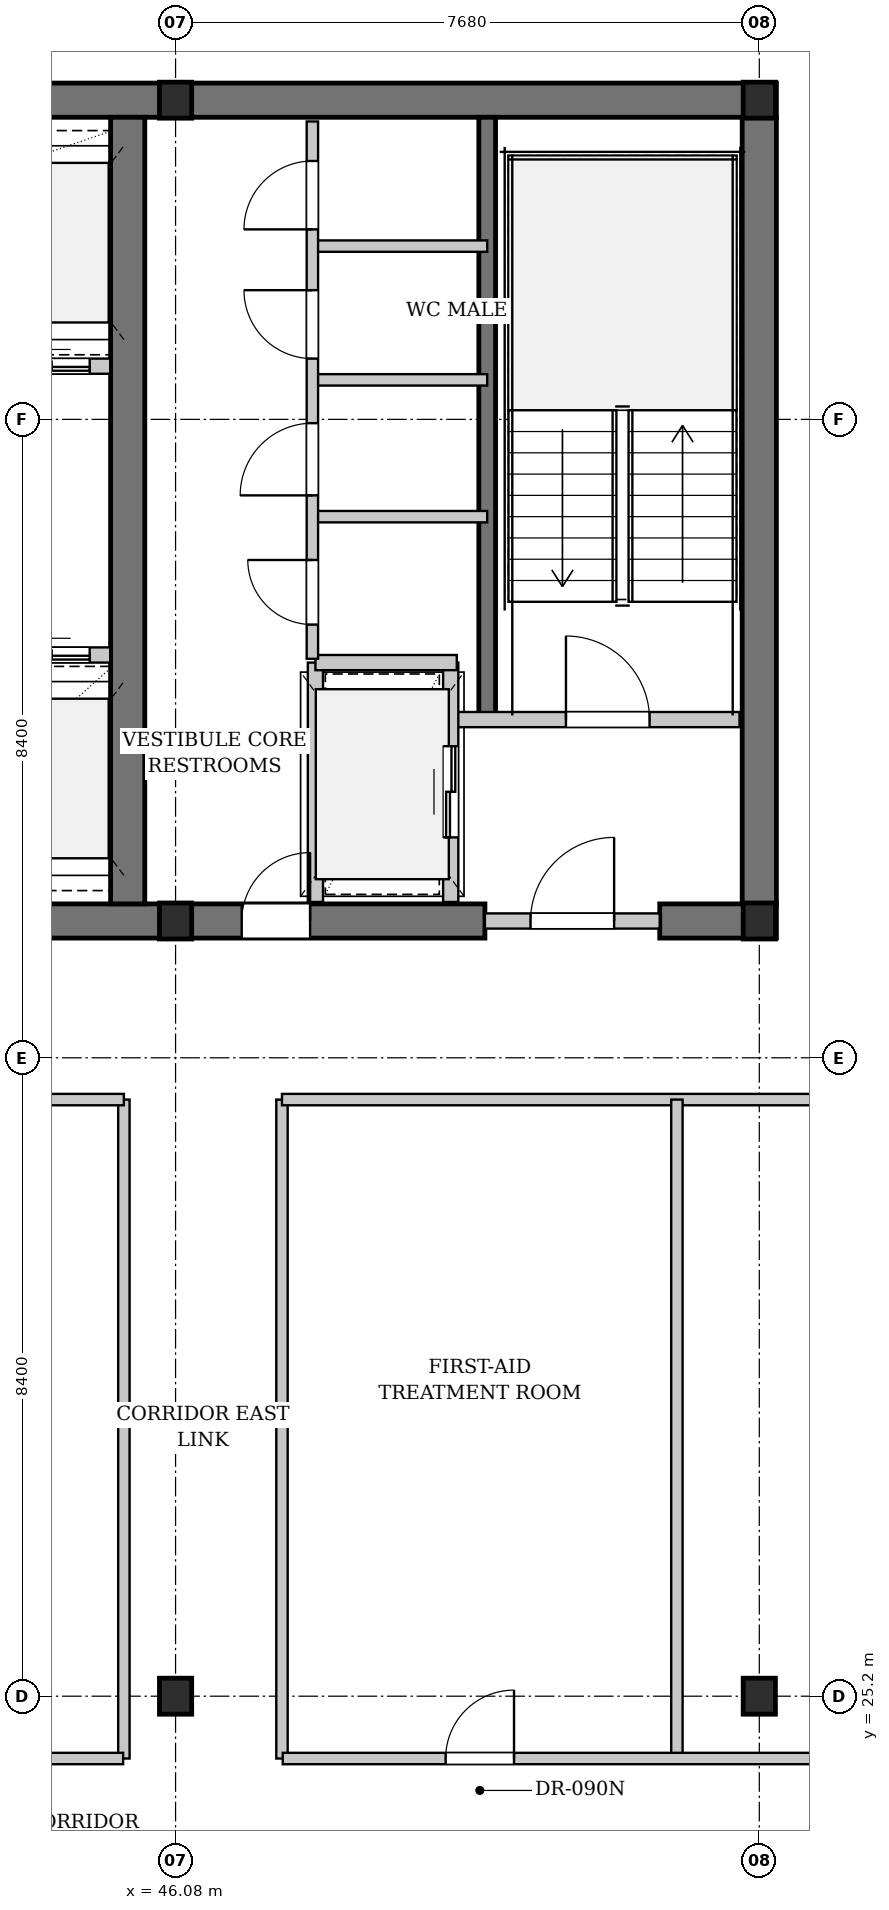
"""IFC4 building model, lengths in metres.
Left out: names, types, materials, properties, quantities, classifications, styles, units other than length and angle.
Written with IfcOpenShell. Run it as: python <this file> out.ifc"""

import sys

from ifc_helpers import new_model, si_unit, direction, frame, frame_2d, origin, origin_2d, place, context, subcontext, project, spatial, rectangle, i_section, extrude, element, fill, save


model = new_model("IFC4")
c1 = context("Model", 3, precision=1e-05, world=origin(), true_north=direction((0.0, 1.0)))
c2 = subcontext(c1, "Body", "Model", "MODEL_VIEW")
j1 = project(units=[si_unit("LENGTHUNIT", "METRE"), si_unit("PLANEANGLEUNIT", "RADIAN")], contexts=[c1])
p1 = place(None, origin())
s1 = spatial("IfcSite", under=j1, at=p1, CompositionType="ELEMENT")
p2 = place(p1, origin())
s2 = spatial("IfcBuilding", under=s1, at=p2, CompositionType="ELEMENT")
p3 = place(p2, frame((0.0, 0.0, 96.5)))
s3 = spatial("IfcBuildingStorey", under=s2, at=p3, CompositionType="ELEMENT", Elevation=96.5)
p4 = place(p3, frame((22.815, 46.2, 0.0), z_axis=(0.0, 0.0, 1.0), x_axis=(1.0, 0.0, 0.0)))
e1 = element("IfcWall", 1, at=p4, inside=s3, PredefinedType="SHEAR", context=c2, shape_type="SweptSolid", body=[
    extrude(rectangle(XDim=31.17, YDim=0.45, at=frame_2d((15.585, 0.0))), origin(), (0.0, 0.0, 1.0), 3.18),
])
p5 = place(p3, frame((42.1, 35.4, 0.0), z_axis=(0.0, 0.0, 1.0), x_axis=(1.0, 0.0, 0.0)))
e2 = element("IfcWall", 2, at=p5, inside=s3, PredefinedType="SHEAR", context=c2, shape_type="SweptSolid", body=[
    extrude(rectangle(XDim=8.05, YDim=0.45, at=frame_2d((4.025, 0.0))), origin(), (0.0, 0.0, 1.0), 3.18),
])
p6 = place(p5, frame((4.85, 0.0, 0.0)))
e3 = element("IfcOpeningElement", 3, at=p6, cuts=e2, PredefinedType="OPENING", context=c2, shape_type="SweptSolid", body=[
    extrude(rectangle(XDim=0.9, YDim=2.15, at=frame_2d((0.45, 1.075))), frame((0.0, 0.235, 0.0), z_axis=(0.0, -1.0, 0.0), x_axis=(1.0, 0.0, 0.0)), (0.0, 0.0, 1.0), 0.47),
])
p7 = place(p3, frame((52.45, 35.4, 0.0), z_axis=(0.0, 0.0, 1.0), x_axis=(1.0, 0.0, 0.0)))
e4 = element("IfcWall", 4, at=p7, inside=s3, PredefinedType="SHEAR", context=c2, shape_type="SweptSolid", body=[
    extrude(rectangle(XDim=1.535, YDim=0.45, at=frame_2d((0.768, 0.0))), origin(), (0.0, 0.0, 1.0), 3.18),
])
for number, where, z_axis, x_axis in (
    (5, (45.45, 35.625, 0.0), (0.0, 0.0, 1.0), (0.0, 1.0, 0.0)),
    (6, (53.76, 35.625, 0.0), (0.0, 0.0, 1.0), (0.0, 1.0, 0.0)),
):
    element("IfcWall", number, at=place(p3, frame(where, z_axis=z_axis, x_axis=x_axis)), inside=s3, PredefinedType="SHEAR", context=c2, shape_type="SweptSolid", body=[
        extrude(rectangle(XDim=10.35, YDim=0.45, at=frame_2d((5.175, 0.0))), origin(), (0.0, 0.0, 1.0), 3.18),
    ])
p8 = place(p3, frame((50.18, 38.05, 0.0), z_axis=(0.0, 0.0, 1.0), x_axis=(0.0, 1.0, 0.0)))
e7 = element("IfcWall", 7, at=p8, inside=s3, PredefinedType="SHEAR", context=c2, shape_type="SweptSolid", body=[
    extrude(rectangle(XDim=7.925, YDim=0.22, at=frame_2d((3.962, 0.0))), origin(), (0.0, 0.0, 1.0), 3.18),
])
for number, where, z_axis, x_axis in (
    (8, (46.08, 35.4, 0.0), (0.0, 0.0, 1.0), (1.0, 0.0, 0.0)),
    (9, (46.08, 46.2, 0.0), (0.0, 0.0, 1.0), (1.0, 0.0, 0.0)),
    (10, (46.08, 25.2, 0.0), (0.0, 0.0, 1.0), (1.0, 0.0, 0.0)),
    (11, (53.76, 35.4, 0.0), (0.0, 0.0, 1.0), (1.0, 0.0, 0.0)),
    (12, (53.76, 46.2, 0.0), (0.0, 0.0, 1.0), (1.0, 0.0, 0.0)),
    (13, (53.76, 25.2, 0.0), (0.0, 0.0, 1.0), (1.0, 0.0, 0.0)),
):
    element("IfcColumn", number, at=place(p3, frame(where, z_axis=z_axis, x_axis=x_axis)), inside=s3, PredefinedType="COLUMN", context=c2, shape_type="SweptSolid", body=[
        extrude(i_section(OverallWidth=0.424, OverallDepth=0.474, WebThickness=0.047, FlangeThickness=0.077, FilletRadius=0.015, at=origin_2d()), origin(), (0.0, 0.0, 1.0), 3.4),
    ])
p9 = place(p3, frame((41.85, 38.9, 0.0), z_axis=(0.0, 0.0, 1.0), x_axis=(1.0, 0.0, 0.0)))
e14 = element("IfcWall", 14, at=p9, inside=s3, PredefinedType="PARTITIONING", context=c2, shape_type="SweptSolid", body=[
    extrude(rectangle(XDim=3.37, YDim=0.2, at=frame_2d((1.685, 0.0))), origin(), (0.0, 0.0, 1.0), 3.18),
])
p10 = place(p9, frame((0.4, 0.0, 0.0)))
e15 = element("IfcOpeningElement", 15, at=p10, cuts=e14, PredefinedType="OPENING", context=c2, shape_type="SweptSolid", body=[
    extrude(rectangle(XDim=1.0, YDim=2.2, at=frame_2d((0.5, 1.1))), frame((0.0, 0.11, 0.0), z_axis=(0.0, -1.0, 0.0), x_axis=(1.0, 0.0, 0.0)), (0.0, 0.0, 1.0), 0.22),
])
p11 = place(p9, frame((2.1, 0.0, 0.0)))
e16 = element("IfcOpeningElement", 16, at=p11, cuts=e14, PredefinedType="OPENING", context=c2, shape_type="SweptSolid", body=[
    extrude(rectangle(XDim=1.0, YDim=2.2, at=frame_2d((0.5, 1.1))), frame((0.0, 0.11, 0.0), z_axis=(0.0, -1.0, 0.0), x_axis=(1.0, 0.0, 0.0)), (0.0, 0.0, 1.0), 0.22),
])
p12 = place(p3, frame((41.85, 42.7, 0.0), z_axis=(0.0, 0.0, 1.0), x_axis=(1.0, 0.0, 0.0)))
e17 = element("IfcWall", 17, at=p12, inside=s3, PredefinedType="PARTITIONING", context=c2, shape_type="SweptSolid", body=[
    extrude(rectangle(XDim=3.37, YDim=0.2, at=frame_2d((1.685, 0.0))), origin(), (0.0, 0.0, 1.0), 3.18),
])
p13 = place(p12, frame((0.4, 0.0, 0.0)))
e18 = element("IfcOpeningElement", 18, at=p13, cuts=e17, PredefinedType="OPENING", context=c2, shape_type="SweptSolid", body=[
    extrude(rectangle(XDim=1.0, YDim=2.2, at=frame_2d((0.5, 1.1))), frame((0.0, 0.11, 0.0), z_axis=(0.0, -1.0, 0.0), x_axis=(1.0, 0.0, 0.0)), (0.0, 0.0, 1.0), 0.22),
])
p14 = place(p12, frame((2.1, 0.0, 0.0)))
e19 = element("IfcOpeningElement", 19, at=p14, cuts=e17, PredefinedType="OPENING", context=c2, shape_type="SweptSolid", body=[
    extrude(rectangle(XDim=1.0, YDim=2.2, at=frame_2d((0.5, 1.1))), frame((0.0, 0.11, 0.0), z_axis=(0.0, -1.0, 0.0), x_axis=(1.0, 0.0, 0.0)), (0.0, 0.0, 1.0), 0.22),
])
p15 = place(p3, frame((49.78, 38.05, 0.0), z_axis=(0.0, 0.0, 1.0), x_axis=(1.0, 0.0, 0.0)))
e20 = element("IfcWall", 20, at=p15, inside=s3, PredefinedType="PARTITIONING", context=c2, shape_type="SweptSolid", body=[
    extrude(rectangle(XDim=3.72, YDim=0.2, at=frame_2d((1.86, 0.0))), origin(), (0.0, 0.0, 1.0), 3.18),
])
p16 = place(p15, frame((1.436, 0.0, 0.0)))
e21 = element("IfcOpeningElement", 21, at=p16, cuts=e20, PredefinedType="OPENING", context=c2, shape_type="SweptSolid", body=[
    extrude(rectangle(XDim=1.1, YDim=2.15, at=frame_2d((0.55, 1.075))), frame((0.0, 0.11, 0.0), z_axis=(0.0, -1.0, 0.0), x_axis=(1.0, 0.0, 0.0)), (0.0, 0.0, 1.0), 0.22),
])
p17 = place(p3, frame((50.15, 35.4, 0.0), z_axis=(0.0, 0.0, 1.0), x_axis=(1.0, 0.0, 0.0)))
e22 = element("IfcWall", 22, at=p17, inside=s3, PredefinedType="PARTITIONING", context=c2, shape_type="SweptSolid", body=[
    extrude(rectangle(XDim=2.3, YDim=0.2, at=frame_2d((1.15, 0.0))), origin(), (0.0, 0.0, 1.0), 2.525),
])
p18 = place(p17, frame((0.6, 0.0, 0.0)))
e23 = element("IfcOpeningElement", 23, at=p18, cuts=e22, PredefinedType="OPENING", context=c2, shape_type="SweptSolid", body=[
    extrude(rectangle(XDim=1.1, YDim=2.15, at=frame_2d((0.55, 1.075))), frame((0.0, 0.11, 0.0), z_axis=(0.0, -1.0, 0.0), x_axis=(1.0, 0.0, 0.0)), (0.0, 0.0, 1.0), 0.22),
])
p19 = place(p3, frame((49.7, 35.65, 0.0), z_axis=(0.0, 0.0, 1.0), x_axis=(0.0, 1.0, 0.0)))
e24 = element("IfcWall", 24, at=p19, inside=s3, PredefinedType="PARTITIONING", context=c2, shape_type="SweptSolid", body=[
    extrude(rectangle(XDim=3.15, YDim=0.2, at=frame_2d((1.575, 0.0))), origin(), (0.0, 0.0, 1.0), 3.18),
])
p20 = place(p19, frame((0.85, 0.0, 0.0)))
e25 = element("IfcOpeningElement", 25, at=p20, cuts=e24, PredefinedType="OPENING", context=c2, shape_type="SweptSolid", body=[
    extrude(rectangle(XDim=1.2, YDim=2.2, at=frame_2d((0.6, 1.1))), frame((0.0, 0.11, 0.0), z_axis=(0.0, -1.0, 0.0), x_axis=(1.0, 0.0, 0.0)), (0.0, 0.0, 1.0), 0.22),
])
p21 = place(p3, frame((47.92, 35.65, 0.0), z_axis=(0.0, 0.0, 1.0), x_axis=(0.0, 1.0, 0.0)))
e26 = element("IfcWall", 26, at=p21, inside=s3, PredefinedType="PARTITIONING", context=c2, shape_type="SweptSolid", body=[
    extrude(rectangle(XDim=3.15, YDim=0.2, at=frame_2d((1.575, 0.0))), origin(), (0.0, 0.0, 1.0), 3.18),
])
p22 = place(p3, frame((47.92, 38.8, 0.0), z_axis=(0.0, 0.0, 1.0), x_axis=(1.0, 0.0, 0.0)))
e27 = element("IfcWall", 27, at=p22, inside=s3, PredefinedType="PARTITIONING", context=c2, shape_type="SweptSolid", body=[
    extrude(rectangle(XDim=1.86, YDim=0.2, at=frame_2d((0.93, 0.0))), origin(), (0.0, 0.0, 1.0), 3.18),
])
for number, where, z_axis, x_axis in (
    (28, (47.88, 40.72, 0.0), (0.0, 0.0, 1.0), (1.0, 0.0, 0.0)),
    (29, (47.88, 42.52, 0.0), (0.0, 0.0, 1.0), (1.0, 0.0, 0.0)),
    (30, (47.88, 44.28, 0.0), (0.0, 0.0, 1.0), (1.0, 0.0, 0.0)),
):
    element("IfcWall", number, at=place(p3, frame(where, z_axis=z_axis, x_axis=x_axis)), inside=s3, PredefinedType="PARTITIONING", context=c2, shape_type="SweptSolid", body=[
        extrude(rectangle(XDim=2.3, YDim=0.15, at=frame_2d((1.15, 0.0))), origin(), (0.0, 0.0, 1.0), 3.18),
    ])
p23 = place(p3, frame((47.88, 38.85, 0.0), z_axis=(0.0, 0.0, 1.0), x_axis=(0.0, 1.0, 0.0)))
e31 = element("IfcWall", 31, at=p23, inside=s3, PredefinedType="PARTITIONING", context=c2, shape_type="SweptSolid", body=[
    extrude(rectangle(XDim=7.07, YDim=0.15, at=frame_2d((3.535, 0.0))), origin(), (0.0, 0.0, 1.0), 3.18),
])
p24 = place(p23, frame((0.45, 0.0, 0.0)))
e32 = element("IfcOpeningElement", 32, at=p24, cuts=e31, PredefinedType="OPENING", context=c2, shape_type="SweptSolid", body=[
    extrude(rectangle(XDim=0.85, YDim=2.15, at=frame_2d((0.425, 1.075))), frame((0.0, 0.085, 0.0), z_axis=(0.0, -1.0, 0.0), x_axis=(1.0, 0.0, 0.0)), (0.0, 0.0, 1.0), 0.17),
])
p25 = place(p23, frame((2.15, 0.0, 0.0)))
e33 = element("IfcOpeningElement", 33, at=p25, cuts=e31, PredefinedType="OPENING", context=c2, shape_type="SweptSolid", body=[
    extrude(rectangle(XDim=0.95, YDim=2.15, at=frame_2d((0.475, 1.075))), frame((0.0, 0.085, 0.0), z_axis=(0.0, -1.0, 0.0), x_axis=(1.0, 0.0, 0.0)), (0.0, 0.0, 1.0), 0.17),
])
p26 = place(p23, frame((3.95, 0.0, 0.0)))
e34 = element("IfcOpeningElement", 34, at=p26, cuts=e31, PredefinedType="OPENING", context=c2, shape_type="SweptSolid", body=[
    extrude(rectangle(XDim=0.9, YDim=2.15, at=frame_2d((0.45, 1.075))), frame((0.0, 0.085, 0.0), z_axis=(0.0, -1.0, 0.0), x_axis=(1.0, 0.0, 0.0)), (0.0, 0.0, 1.0), 0.17),
])
p27 = place(p23, frame((5.65, 0.0, 0.0)))
e35 = element("IfcOpeningElement", 35, at=p27, cuts=e31, PredefinedType="OPENING", context=c2, shape_type="SweptSolid", body=[
    extrude(rectangle(XDim=0.9, YDim=2.15, at=frame_2d((0.45, 1.075))), frame((0.0, 0.085, 0.0), z_axis=(0.0, -1.0, 0.0), x_axis=(1.0, 0.0, 0.0)), (0.0, 0.0, 1.0), 0.17),
])
for number, where, z_axis, x_axis in (
    (36, (45.4, 24.38, 0.0), (0.0, 0.0, 1.0), (0.0, 1.0, 0.0)),
    (37, (47.48, 24.38, 0.0), (0.0, 0.0, 1.0), (0.0, 1.0, 0.0)),
):
    element("IfcWall", number, at=place(p3, frame(where, z_axis=z_axis, x_axis=x_axis)), inside=s3, PredefinedType="PARTITIONING", context=c2, shape_type="SweptSolid", body=[
        extrude(rectangle(XDim=8.67, YDim=0.15, at=frame_2d((4.335, 0.0))), origin(), (0.0, 0.0, 1.0), 3.18),
    ])
p28 = place(p3, frame((31.48, 33.05, 0.0), z_axis=(0.0, 0.0, 1.0), x_axis=(1.0, 0.0, 0.0)))
e38 = element("IfcWall", 38, at=p28, inside=s3, PredefinedType="PARTITIONING", context=c2, shape_type="SweptSolid", body=[
    extrude(rectangle(XDim=13.92, YDim=0.15, at=frame_2d((6.96, 0.0))), origin(), (0.0, 0.0, 1.0), 3.18),
])
p29 = place(p3, frame((47.48, 33.05, 0.0), z_axis=(0.0, 0.0, 1.0), x_axis=(1.0, 0.0, 0.0)))
e39 = element("IfcWall", 39, at=p29, inside=s3, PredefinedType="PARTITIONING", context=c2, shape_type="SweptSolid", body=[
    extrude(rectangle(XDim=22.578, YDim=0.15, at=frame_2d((11.289, 0.0))), origin(), (0.0, 0.0, 1.0), 2.525),
])
p30 = place(p3, frame((31.49, 24.38, 0.0), z_axis=(0.0, 0.0, 1.0), x_axis=(1.0, 0.0, 0.0)))
e40 = element("IfcWall", 40, at=p30, inside=s3, PredefinedType="PARTITIONING", context=c2, shape_type="SweptSolid", body=[
    extrude(rectangle(XDim=13.9, YDim=0.15, at=frame_2d((6.95, 0.0))), origin(), (0.0, 0.0, 1.0), 3.18),
])
p31 = place(p30, frame((4.306, 0.0, 0.0)))
e41 = element("IfcOpeningElement", 41, at=p31, cuts=e40, PredefinedType="OPENING", context=c2, shape_type="SweptSolid", body=[
    extrude(rectangle(XDim=0.9, YDim=2.15, at=frame_2d((0.45, 1.075))), frame((0.0, 0.085, 0.0), z_axis=(0.0, -1.0, 0.0), x_axis=(1.0, 0.0, 0.0)), (0.0, 0.0, 1.0), 0.17),
])
p32 = place(p3, frame((52.676, 24.38, 0.0), z_axis=(0.0, 0.0, 1.0), x_axis=(0.0, 1.0, 0.0)))
e42 = element("IfcWall", 42, at=p32, inside=s3, PredefinedType="PARTITIONING", context=c2, shape_type="SweptSolid", body=[
    extrude(rectangle(XDim=8.67, YDim=0.15, at=frame_2d((4.335, 0.0))), origin(), (0.0, 0.0, 1.0), 3.18),
])
p33 = place(p3, frame((47.49, 24.38, 0.0), z_axis=(0.0, 0.0, 1.0), x_axis=(1.0, 0.0, 0.0)))
e43 = element("IfcWall", 43, at=p33, inside=s3, PredefinedType="PARTITIONING", context=c2, shape_type="SweptSolid", body=[
    extrude(rectangle(XDim=22.548, YDim=0.15, at=frame_2d((11.274, 0.0))), origin(), (0.0, 0.0, 1.0), 3.18),
])
p34 = place(p33, frame((2.143, 0.0, 0.0)))
e44 = element("IfcOpeningElement", 44, at=p34, cuts=e43, PredefinedType="OPENING", context=c2, shape_type="SweptSolid", body=[
    extrude(rectangle(XDim=0.9, YDim=2.15, at=frame_2d((0.45, 1.075))), frame((0.0, 0.085, 0.0), z_axis=(0.0, -1.0, 0.0), x_axis=(1.0, 0.0, 0.0)), (0.0, 0.0, 1.0), 0.17),
])
p35 = place(p33, frame((11.753, 0.0, 0.0)))
e45 = element("IfcOpeningElement", 45, at=p35, cuts=e43, PredefinedType="OPENING", context=c2, shape_type="SweptSolid", body=[
    extrude(rectangle(XDim=0.9, YDim=2.15, at=frame_2d((0.45, 1.075))), frame((0.0, 0.085, 0.0), z_axis=(0.0, -1.0, 0.0), x_axis=(1.0, 0.0, 0.0)), (0.0, 0.0, 1.0), 0.17),
])
p36 = place(p33, frame((17.476, 0.0, 0.0)))
e46 = element("IfcOpeningElement", 46, at=p36, cuts=e43, PredefinedType="OPENING", context=c2, shape_type="SweptSolid", body=[
    extrude(rectangle(XDim=0.9, YDim=2.15, at=frame_2d((0.45, 1.075))), frame((0.0, 0.085, 0.0), z_axis=(0.0, -1.0, 0.0), x_axis=(1.0, 0.0, 0.0)), (0.0, 0.0, 1.0), 0.17),
])
p37 = place(p11, origin())
e47 = element("IfcDoor", 47, at=p37, inside=s3, OperationType="DOUBLE_DOOR_SLIDING", PredefinedType="DOOR", context=c2, shape_type="SweptSolid", body=[
    extrude(rectangle(XDim=1.0, YDim=2.2, at=frame_2d((0.5, 1.1))), frame((0.0, 0.025, 0.0), z_axis=(0.0, -1.0, 0.0), x_axis=(1.0, 0.0, 0.0)), (0.0, 0.0, 1.0), 0.05),
])
fill(e16, e47)
p38 = place(p14, origin())
e48 = element("IfcDoor", 48, at=p38, inside=s3, OperationType="DOUBLE_DOOR_SLIDING", PredefinedType="DOOR", context=c2, shape_type="SweptSolid", body=[
    extrude(rectangle(XDim=1.0, YDim=2.2, at=frame_2d((0.5, 1.1))), frame((0.0, 0.025, 0.0), z_axis=(0.0, -1.0, 0.0), x_axis=(1.0, 0.0, 0.0)), (0.0, 0.0, 1.0), 0.05),
])
fill(e19, e48)
p39 = place(p16, origin())
e49 = element("IfcDoor", 49, at=p39, inside=s3, OperationType="SINGLE_SWING_LEFT", PredefinedType="DOOR", context=c2, shape_type="SweptSolid", body=[
    extrude(rectangle(XDim=1.1, YDim=2.15, at=frame_2d((0.55, 1.075))), frame((0.0, 0.025, 0.0), z_axis=(0.0, -1.0, 0.0), x_axis=(1.0, 0.0, 0.0)), (0.0, 0.0, 1.0), 0.05),
])
fill(e21, e49)
p40 = place(p18, origin())
e50 = element("IfcDoor", 50, at=p40, inside=s3, OperationType="SINGLE_SWING_RIGHT", PredefinedType="DOOR", context=c2, shape_type="SweptSolid", body=[
    extrude(rectangle(XDim=1.1, YDim=2.15, at=frame_2d((0.55, 1.075))), frame((0.0, 0.025, 0.0), z_axis=(0.0, -1.0, 0.0), x_axis=(1.0, 0.0, 0.0)), (0.0, 0.0, 1.0), 0.05),
])
fill(e23, e50)
p41 = place(p20, origin())
e51 = element("IfcDoor", 51, at=p41, inside=s3, OperationType="DOUBLE_DOOR_SLIDING", PredefinedType="DOOR", context=c2, shape_type="SweptSolid", body=[
    extrude(rectangle(XDim=1.2, YDim=2.2, at=frame_2d((0.6, 1.1))), frame((0.0, 0.025, 0.0), z_axis=(0.0, -1.0, 0.0), x_axis=(1.0, 0.0, 0.0)), (0.0, 0.0, 1.0), 0.05),
])
fill(e25, e51)
p42 = place(p24, origin())
e52 = element("IfcDoor", 52, at=p42, inside=s3, OperationType="SINGLE_SWING_RIGHT", PredefinedType="DOOR", context=c2, shape_type="SweptSolid", body=[
    extrude(rectangle(XDim=0.85, YDim=2.15, at=frame_2d((0.425, 1.075))), frame((0.0, 0.025, 0.0), z_axis=(0.0, -1.0, 0.0), x_axis=(1.0, 0.0, 0.0)), (0.0, 0.0, 1.0), 0.05),
])
fill(e32, e52)
p43 = place(p25, origin())
e53 = element("IfcDoor", 53, at=p43, inside=s3, OperationType="SINGLE_SWING_LEFT", PredefinedType="DOOR", context=c2, shape_type="SweptSolid", body=[
    extrude(rectangle(XDim=0.95, YDim=2.15, at=frame_2d((0.475, 1.075))), frame((0.0, 0.025, 0.0), z_axis=(0.0, -1.0, 0.0), x_axis=(1.0, 0.0, 0.0)), (0.0, 0.0, 1.0), 0.05),
])
fill(e33, e53)
p44 = place(p26, origin())
e54 = element("IfcDoor", 54, at=p44, inside=s3, OperationType="SINGLE_SWING_RIGHT", PredefinedType="DOOR", context=c2, shape_type="SweptSolid", body=[
    extrude(rectangle(XDim=0.9, YDim=2.15, at=frame_2d((0.45, 1.075))), frame((0.0, 0.025, 0.0), z_axis=(0.0, -1.0, 0.0), x_axis=(1.0, 0.0, 0.0)), (0.0, 0.0, 1.0), 0.05),
])
fill(e34, e54)
p45 = place(p27, origin())
e55 = element("IfcDoor", 55, at=p45, inside=s3, OperationType="SINGLE_SWING_LEFT", PredefinedType="DOOR", context=c2, shape_type="SweptSolid", body=[
    extrude(rectangle(XDim=0.9, YDim=2.15, at=frame_2d((0.45, 1.075))), frame((0.0, 0.025, 0.0), z_axis=(0.0, -1.0, 0.0), x_axis=(1.0, 0.0, 0.0)), (0.0, 0.0, 1.0), 0.05),
])
fill(e35, e55)
p46 = place(p34, origin())
e56 = element("IfcDoor", 56, at=p46, inside=s3, OperationType="SINGLE_SWING_RIGHT", PredefinedType="DOOR", context=c2, shape_type="SweptSolid", body=[
    extrude(rectangle(XDim=0.9, YDim=2.15, at=frame_2d((0.45, 1.075))), frame((0.0, 0.025, 0.0), z_axis=(0.0, -1.0, 0.0), x_axis=(1.0, 0.0, 0.0)), (0.0, 0.0, 1.0), 0.05),
])
fill(e44, e56)
p47 = place(p6, origin())
e57 = element("IfcDoor", 57, at=p47, inside=s3, OperationType="SINGLE_SWING_RIGHT", PredefinedType="DOOR", context=c2, shape_type="SweptSolid", body=[
    extrude(rectangle(XDim=0.9, YDim=2.15, at=frame_2d((0.45, 1.075))), frame((0.0, 0.025, 0.0), z_axis=(0.0, -1.0, 0.0), x_axis=(1.0, 0.0, 0.0)), (0.0, 0.0, 1.0), 0.05),
])
fill(e3, e57)
save(model, sys.argv[1])
